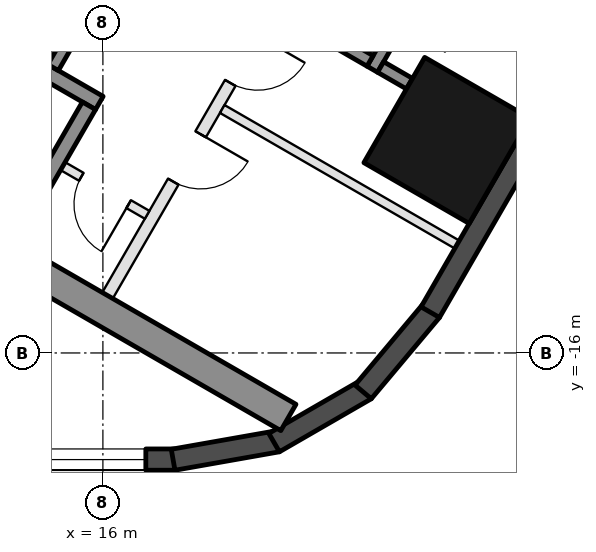
"""IFC4 building model, lengths in metres.
Left out: names, types, materials, properties, quantities, classifications, styles, units other than length and angle.
Written with IfcOpenShell. Run it as: python <this file> out.ifc"""

import sys

from ifc_helpers import new_model, si_unit, direction, frame, frame_2d, origin, origin_2d, place, context, subcontext, project, spatial, rectangle, hollow_rectangle, extrude, boolean, halfspace, element, fill, save


model = new_model("IFC4")
c1 = context("Model", 3, precision=1e-05, world=origin(), true_north=direction((0.0, 1.0)))
c2 = subcontext(c1, "Body", "Model", "MODEL_VIEW")
j1 = project(units=[si_unit("LENGTHUNIT", "METRE"), si_unit("PLANEANGLEUNIT", "RADIAN")], contexts=[c1])
p1 = place(None, origin())
s1 = spatial("IfcSite", under=j1, at=p1, CompositionType="ELEMENT")
p2 = place(p1, origin())
s2 = spatial("IfcBuilding", under=s1, at=p2, CompositionType="ELEMENT")
p3 = place(p2, frame((0.0, 0.0, 283.7)))
s3 = spatial("IfcBuildingStorey", under=s2, at=p3, CompositionType="ELEMENT", Elevation=283.7)
p4 = place(p3, frame((21.658, -12.504, 0.0), z_axis=(0.0, 0.0, 1.0), x_axis=(0.5, 0.866025403784, 0.0)))
e1 = element("IfcColumn", 1, at=p4, inside=s3, PredefinedType="COLUMN", context=c2, shape_type="SweptSolid", body=[
    boolean("DIFFERENCE", extrude(hollow_rectangle(XDim=2.0, YDim=2.0, WallThickness=0.05, at=origin_2d()), origin(), (0.0, 0.0, 1.0), 3.7), halfspace(frame((0.0, 0.0, 3.587), z_axis=(0.0, 0.0, 1.0), x_axis=(1.0, 0.0, 0.0)), False)),
])
p5 = place(p3, frame((13.531, -17.754, 0.0), z_axis=(0.0, 0.0, 1.0), x_axis=(1.0, 0.0, 0.0)))
e2 = element("IfcWall", 2, at=p5, inside=s3, PredefinedType="SOLIDWALL", context=c2, shape_type="SweptSolid", body=[
    extrude(rectangle(XDim=3.654, YDim=0.35, at=frame_2d((1.827, 0.0))), origin(), (0.0, 0.0, 1.0), 3.55),
])
p6 = place(p5, frame((1.575, 0.0, 0.3)))
e3 = element("IfcOpeningElement", 3, at=p6, cuts=e2, PredefinedType="OPENING", context=c2, shape_type="SweptSolid", body=[
    extrude(rectangle(XDim=1.6, YDim=2.65, at=frame_2d((0.8, 1.325))), frame((0.0, 0.185, 0.0), z_axis=(0.0, -1.0, 0.0), x_axis=(1.0, 0.0, 0.0)), (0.0, 0.0, 1.0), 0.37),
])
for number, where, z_axis, x_axis in (
    (4, (17.155, -17.756, 0.0), (0.0, 0.0, 1.0), (0.985, 0.174, 0.0)),
    (5, (18.816, -17.474, 0.0), (0.0, 0.0, 1.0), (0.866, 0.5, 0.0)),
    (6, (20.28, -16.641, 0.0), (0.0, 0.0, 1.0), (0.643, 0.766, 0.0)),
):
    element("IfcWall", number, at=place(p3, frame(where, z_axis=z_axis, x_axis=x_axis)), inside=s3, PredefinedType="SOLIDWALL", context=c2, shape_type="SweptSolid", body=[
        extrude(rectangle(XDim=1.745, YDim=0.35, at=frame_2d((0.872, 0.0))), origin(), (0.0, 0.0, 1.0), 3.55),
    ])
p7 = place(p3, frame((21.384, -15.33, 0.0), z_axis=(0.0, 0.0, 1.0), x_axis=(0.500020983425, 0.866013288659, 0.0)))
e7 = element("IfcWall", 7, at=p7, inside=s3, PredefinedType="SOLIDWALL", context=c2, shape_type="SweptSolid", body=[
    extrude(rectangle(XDim=5.168, YDim=0.35, at=frame_2d((2.584, 0.0))), origin(), (0.0, 0.0, 1.0), 3.55),
])
p8 = place(p3, frame((8.547, -10.997, 0.0), z_axis=(0.0, 0.0, 1.0), x_axis=(0.866024688907, -0.500001238203, 0.0)))
e8 = element("IfcWall", 8, at=p8, inside=s3, PredefinedType="SHEAR", context=c2, shape_type="SweptSolid", body=[
    extrude(rectangle(XDim=12.129, YDim=0.5, at=frame_2d((6.064, 0.0))), origin(), (0.0, 0.0, 1.0), 3.5),
])
p9 = place(p3, frame((10.356, -8.664, 0.0), z_axis=(0.0, 0.0, 1.0), x_axis=(0.866028629588, -0.499994412703, 0.0)))
e9 = element("IfcWall", 9, at=p9, inside=s3, PredefinedType="SHEAR", context=c2, shape_type="SweptSolid", body=[
    extrude(rectangle(XDim=6.45, YDim=0.25, at=frame_2d((3.225, 0.0))), origin(), (0.0, 0.0, 1.0), 3.5),
])
p10 = place(p9, frame((0.3, 0.0, 0.0)))
e10 = element("IfcOpeningElement", 10, at=p10, cuts=e9, PredefinedType="OPENING", context=c2, shape_type="SweptSolid", body=[
    extrude(rectangle(XDim=1.0, YDim=2.1, at=frame_2d((0.5, 1.05))), frame((0.0, 0.135, 0.0), z_axis=(0.0, -1.0, 0.0), x_axis=(1.0, 0.0, 0.0)), (0.0, 0.0, 1.0), 0.27),
])
p11 = place(p3, frame((14.496, -14.143, 0.0), z_axis=(0.0, 0.0, 1.0), x_axis=(0.500062241894, 0.865989465428, 0.0)))
e11 = element("IfcWall", 11, at=p11, inside=s3, PredefinedType="SHEAR", context=c2, shape_type="SweptSolid", body=[
    extrude(rectangle(XDim=2.55, YDim=0.25, at=frame_2d((1.275, 0.0))), origin(), (0.0, 0.0, 1.0), 3.5),
])
p12 = place(p3, frame((15.181, -11.305, 0.0), z_axis=(0.0, 0.0, 1.0), x_axis=(0.49994636267, 0.866056369097, 0.0)))
e12 = element("IfcWall", 12, at=p12, inside=s3, PredefinedType="SHEAR", context=c2, shape_type="SweptSolid", body=[
    extrude(rectangle(XDim=2.8, YDim=0.2, at=frame_2d((1.4, 0.0))), origin(), (0.0, 0.0, 1.0), 3.5),
])
p13 = place(p3, frame((20.43, -11.333, 0.0), z_axis=(0.0, 0.0, 1.0), x_axis=(0.500001309137, 0.866024647952, 0.0)))
e13 = element("IfcWall", 13, at=p13, inside=s3, PredefinedType="SHEAR", context=c2, shape_type="SweptSolid", body=[
    extrude(rectangle(XDim=2.4, YDim=0.2, at=frame_2d((1.2, 0.0))), origin(), (0.0, 0.0, 1.0), 3.5),
])
p14 = place(p13, frame((0.85, 0.0, 0.0)))
e14 = element("IfcOpeningElement", 14, at=p14, cuts=e13, PredefinedType="OPENING", context=c2, shape_type="SweptSolid", body=[
    extrude(rectangle(XDim=0.9, YDim=2.1, at=frame_2d((0.45, 1.05))), frame((0.0, 0.11, 0.0), z_axis=(0.0, -1.0, 0.0), x_axis=(1.0, 0.0, 0.0)), (0.0, 0.0, 1.0), 0.22),
])
p15 = place(p3, frame((18.913, -10.342, 0.0), z_axis=(0.0, 0.0, 1.0), x_axis=(0.866038183914, -0.499977863513, 0.0)))
e15 = element("IfcWall", 15, at=p15, inside=s3, PredefinedType="SHEAR", context=c2, shape_type="SweptSolid", body=[
    extrude(rectangle(XDim=1.71, YDim=0.2, at=frame_2d((0.855, 0.0))), origin(), (0.0, 0.0, 1.0), 3.5),
])
p16 = place(p3, frame((20.567, -11.297, 0.0), z_axis=(0.0, 0.0, 1.0), x_axis=(0.866237429803, -0.49963258021, 0.0)))
e16 = element("IfcWall", 16, at=p16, inside=s3, PredefinedType="SHEAR", context=c2, shape_type="SweptSolid", body=[
    extrude(rectangle(XDim=0.549, YDim=0.2, at=frame_2d((0.274, 0.0))), origin(), (0.0, 0.0, 1.0), 3.5),
])
p17 = place(p3, frame((16.076, -15.055, 0.0), z_axis=(0.0, 0.0, 1.0), x_axis=(0.499995103361, 0.866028230842, 0.0)))
e17 = element("IfcWall", 17, at=p17, inside=s3, PredefinedType="PARTITIONING", context=c2, shape_type="SweptSolid", body=[
    extrude(rectangle(XDim=5.4, YDim=0.2, at=frame_2d((2.7, 0.0))), origin(), (0.0, 0.0, 1.0), 3.5),
])
p18 = place(p17, frame((2.163, 0.0, 0.0)))
e18 = element("IfcOpeningElement", 18, at=p18, cuts=e17, PredefinedType="OPENING", context=c2, shape_type="SweptSolid", body=[
    extrude(rectangle(XDim=0.9, YDim=2.1, at=frame_2d((0.45, 1.05))), frame((0.0, 0.11, 0.0), z_axis=(0.0, -1.0, 0.0), x_axis=(1.0, 0.0, 0.0)), (0.0, 0.0, 1.0), 0.22),
])
p19 = place(p17, frame((4.038, 0.0, 0.0)))
e19 = element("IfcOpeningElement", 19, at=p19, cuts=e17, PredefinedType="OPENING", context=c2, shape_type="SweptSolid", body=[
    extrude(rectangle(XDim=0.9, YDim=2.1, at=frame_2d((0.45, 1.05))), frame((0.0, 0.11, 0.0), z_axis=(0.0, -1.0, 0.0), x_axis=(1.0, 0.0, 0.0)), (0.0, 0.0, 1.0), 0.22),
])
p20 = place(p3, frame((15.342, -12.928, 0.0), z_axis=(0.0, 0.0, 1.0), x_axis=(0.865989903783, -0.500061482766, 0.0)))
e20 = element("IfcWall", 20, at=p20, inside=s3, PredefinedType="PARTITIONING", context=c2, shape_type="SweptSolid", body=[
    extrude(rectangle(XDim=1.6, YDim=0.15, at=frame_2d((0.8, 0.0))), origin(), (0.0, 0.0, 1.0), 3.5),
])
p21 = place(p20, frame((0.35, 0.0, 0.0)))
e21 = element("IfcOpeningElement", 21, at=p21, cuts=e20, PredefinedType="OPENING", context=c2, shape_type="SweptSolid", body=[
    extrude(rectangle(XDim=0.9, YDim=2.1, at=frame_2d((0.45, 1.05))), frame((0.0, 0.085, 0.0), z_axis=(0.0, -1.0, 0.0), x_axis=(1.0, 0.0, 0.0)), (0.0, 0.0, 1.0), 0.17),
])
p22 = place(p3, frame((17.963, -11.987, 0.0), z_axis=(0.0, 0.0, 1.0), x_axis=(0.866010510293, -0.500025795397, 0.0)))
e22 = element("IfcWall", 22, at=p22, inside=s3, PredefinedType="PARTITIONING", context=c2, shape_type="SweptSolid", body=[
    extrude(rectangle(XDim=4.459, YDim=0.15, at=frame_2d((2.229, 0.0))), origin(), (0.0, 0.0, 1.0), 3.5),
])
p23 = place(p6, origin())
e23 = element("IfcWindow", 23, at=p23, inside=s3, PartitioningType="SINGLE_PANEL", PredefinedType="WINDOW", context=c2, shape_type="SweptSolid", body=[
    extrude(rectangle(XDim=1.6, YDim=2.65, at=frame_2d((0.8, 1.325))), frame((0.0, 0.03, 0.0), z_axis=(0.0, -1.0, 0.0), x_axis=(1.0, 0.0, 0.0)), (0.0, 0.0, 1.0), 0.06),
])
fill(e3, e23)
p24 = place(p21, frame((0.9, 0.0, 0.0), z_axis=(0.0, 0.0, 1.0), x_axis=(-1.0, 0.0, 0.0)))
e24 = element("IfcDoor", 24, at=p24, inside=s3, OperationType="SINGLE_SWING_LEFT", PredefinedType="DOOR", context=c2, shape_type="SweptSolid", body=[
    extrude(rectangle(XDim=0.9, YDim=2.1, at=frame_2d((0.45, 1.05))), frame((0.0, 0.025, 0.0), z_axis=(0.0, -1.0, 0.0), x_axis=(1.0, 0.0, 0.0)), (0.0, 0.0, 1.0), 0.05),
])
fill(e21, e24)
p25 = place(p18, frame((0.9, 0.0, 0.0), z_axis=(0.0, 0.0, 1.0), x_axis=(-1.0, 0.0, 0.0)))
e25 = element("IfcDoor", 25, at=p25, inside=s3, OperationType="SINGLE_SWING_LEFT", PredefinedType="DOOR", context=c2, shape_type="SweptSolid", body=[
    extrude(rectangle(XDim=0.9, YDim=2.1, at=frame_2d((0.45, 1.05))), frame((0.0, 0.025, 0.0), z_axis=(0.0, -1.0, 0.0), x_axis=(1.0, 0.0, 0.0)), (0.0, 0.0, 1.0), 0.05),
])
fill(e18, e25)
p26 = place(p19, frame((0.9, 0.0, 0.0), z_axis=(0.0, 0.0, 1.0), x_axis=(-1.0, 0.0, 0.0)))
e26 = element("IfcDoor", 26, at=p26, inside=s3, OperationType="SINGLE_SWING_LEFT", PredefinedType="DOOR", context=c2, shape_type="SweptSolid", body=[
    extrude(rectangle(XDim=0.9, YDim=2.1, at=frame_2d((0.45, 1.05))), frame((0.0, 0.025, 0.0), z_axis=(0.0, -1.0, 0.0), x_axis=(1.0, 0.0, 0.0)), (0.0, 0.0, 1.0), 0.05),
])
fill(e19, e26)
save(model, sys.argv[1])
